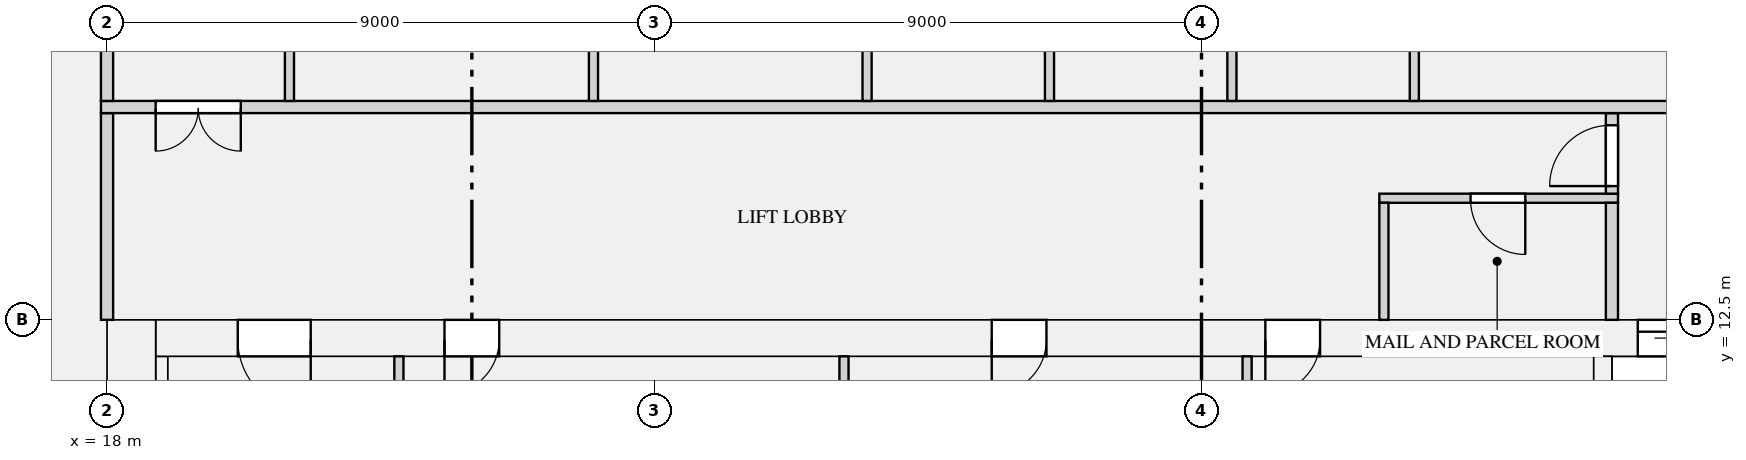
"""IFC4 building model, lengths in metres.
Left out: names, types, materials, properties, quantities, classifications, styles, units other than length and angle.
Written with IfcOpenShell. Run it as: python <this file> out.ifc"""

import sys

from ifc_helpers import new_model, si_unit, direction, frame, frame_2d, origin, place, context, subcontext, project, spatial, rectangle, extrude, element, fill, save


model = new_model("IFC4")
c1 = context("Model", 3, precision=1e-05, world=origin(), true_north=direction((0.0, 1.0)))
c2 = subcontext(c1, "Body", "Model", "MODEL_VIEW")
j1 = project(units=[si_unit("LENGTHUNIT", "METRE"), si_unit("PLANEANGLEUNIT", "RADIAN")], contexts=[c1])
p1 = place(None, origin())
s1 = spatial("IfcSite", under=j1, at=p1, CompositionType="ELEMENT")
p2 = place(p1, origin())
s2 = spatial("IfcBuilding", under=s1, at=p2, CompositionType="ELEMENT")
p3 = place(p2, frame((0.0, 0.0, 102.45)))
s3 = spatial("IfcBuildingStorey", under=s2, at=p3, CompositionType="ELEMENT", Elevation=102.45)
p4 = place(p3, frame((18.4, 0.0, 0.0), z_axis=(0.0, 0.0, 1.0), x_axis=(0.0, 1.0, 0.0)))
e1 = element("IfcWall", 1, at=p4, inside=s3, PredefinedType="SHEAR", context=c2, shape_type="SweptSolid", body=[
    extrude(rectangle(XDim=12.5, YDim=0.8, at=frame_2d((6.25, 0.0))), origin(), (0.0, 0.0, 1.0), 3.15),
])
p5 = place(p3, frame((18.8, 12.2, 0.0), z_axis=(0.0, 0.0, 1.0), x_axis=(1.0, 0.0, 0.0)))
e2 = element("IfcWall", 2, at=p5, inside=s3, PredefinedType="SHEAR", context=c2, shape_type="SweptSolid", body=[
    extrude(rectangle(XDim=34.4, YDim=0.6, at=frame_2d((17.2, 0.0))), origin(), (0.0, 0.0, 1.0), 3.15),
])
p6 = place(p5, frame((24.375, 0.0, 0.0)))
e3 = element("IfcOpeningElement", 3, at=p6, cuts=e2, PredefinedType="OPENING", context=c2, shape_type="SweptSolid", body=[
    extrude(rectangle(XDim=1.1, YDim=2.1, at=frame_2d((0.55, 1.05))), frame((0.0, 0.31, 0.0), z_axis=(0.0, -1.0, 0.0), x_axis=(1.0, 0.0, 0.0)), (0.0, 0.0, 1.0), 0.62),
])
p7 = place(p5, frame((26.625, 0.0, 0.0)))
e4 = element("IfcOpeningElement", 4, at=p7, cuts=e2, PredefinedType="OPENING", context=c2, shape_type="SweptSolid", body=[
    extrude(rectangle(XDim=1.1, YDim=2.1, at=frame_2d((0.55, 1.05))), frame((0.0, 0.31, 0.0), z_axis=(0.0, -1.0, 0.0), x_axis=(1.0, 0.0, 0.0)), (0.0, 0.0, 1.0), 0.62),
])
p8 = place(p5, frame((28.875, 0.0, 0.0)))
e5 = element("IfcOpeningElement", 5, at=p8, cuts=e2, PredefinedType="OPENING", context=c2, shape_type="SweptSolid", body=[
    extrude(rectangle(XDim=1.1, YDim=2.1, at=frame_2d((0.55, 1.05))), frame((0.0, 0.31, 0.0), z_axis=(0.0, -1.0, 0.0), x_axis=(1.0, 0.0, 0.0)), (0.0, 0.0, 1.0), 0.62),
])
p9 = place(p5, frame((4.75, 0.0, 0.0)))
e6 = element("IfcOpeningElement", 6, at=p9, cuts=e2, PredefinedType="OPENING", context=c2, shape_type="SweptSolid", body=[
    extrude(rectangle(XDim=0.9, YDim=2.1, at=frame_2d((0.45, 1.05))), frame((0.0, 0.31, 0.0), z_axis=(0.0, -1.0, 0.0), x_axis=(1.0, 0.0, 0.0)), (0.0, 0.0, 1.0), 0.62),
])
p10 = place(p5, frame((13.75, 0.0, 0.0)))
e7 = element("IfcOpeningElement", 7, at=p10, cuts=e2, PredefinedType="OPENING", context=c2, shape_type="SweptSolid", body=[
    extrude(rectangle(XDim=0.9, YDim=2.1, at=frame_2d((0.45, 1.05))), frame((0.0, 0.31, 0.0), z_axis=(0.0, -1.0, 0.0), x_axis=(1.0, 0.0, 0.0)), (0.0, 0.0, 1.0), 0.62),
])
p11 = place(p5, frame((18.25, 0.0, 0.0)))
e8 = element("IfcOpeningElement", 8, at=p11, cuts=e2, PredefinedType="OPENING", context=c2, shape_type="SweptSolid", body=[
    extrude(rectangle(XDim=0.9, YDim=2.1, at=frame_2d((0.45, 1.05))), frame((0.0, 0.31, 0.0), z_axis=(0.0, -1.0, 0.0), x_axis=(1.0, 0.0, 0.0)), (0.0, 0.0, 1.0), 0.62),
])
p12 = place(p5, frame((1.35, 0.0, 0.0)))
e9 = element("IfcOpeningElement", 9, at=p12, cuts=e2, PredefinedType="OPENING", context=c2, shape_type="SweptSolid", body=[
    extrude(rectangle(XDim=1.2, YDim=2.1, at=frame_2d((0.6, 1.05))), frame((0.0, 0.31, 0.0), z_axis=(0.0, -1.0, 0.0), x_axis=(1.0, 0.0, 0.0)), (0.0, 0.0, 1.0), 0.62),
])
p13 = place(p5, frame((31.85, 0.0, 0.0)))
e10 = element("IfcOpeningElement", 10, at=p13, cuts=e2, PredefinedType="OPENING", context=c2, shape_type="SweptSolid", body=[
    extrude(rectangle(XDim=1.2, YDim=2.1, at=frame_2d((0.6, 1.05))), frame((0.0, 0.31, 0.0), z_axis=(0.0, -1.0, 0.0), x_axis=(1.0, 0.0, 0.0)), (0.0, 0.0, 1.0), 0.62),
])
p14 = place(p3, frame((18.9, 1.0, 0.0), z_axis=(0.0, 0.0, 1.0), x_axis=(0.0, 1.0, 0.0)))
e11 = element("IfcWall", 11, at=p14, inside=s3, PredefinedType="SHEAR", context=c2, shape_type="SweptSolid", body=[
    extrude(rectangle(XDim=10.9, YDim=0.2, at=frame_2d((5.45, 0.0))), origin(), (0.0, 0.0, 1.0), 3.15),
])
p15 = place(p3, frame((42.6, 8.25, 0.0), z_axis=(0.0, 0.0, 1.0), x_axis=(0.0, 1.0, 0.0)))
e12 = element("IfcWall", 12, at=p15, inside=s3, PredefinedType="SHEAR", context=c2, shape_type="SweptSolid", body=[
    extrude(rectangle(XDim=3.65, YDim=0.3, at=frame_2d((1.825, 0.0))), origin(), (0.0, 0.0, 1.0), 3.15),
])
p16 = place(p3, frame((38.925, 14.5, 0.0), z_axis=(0.0, 0.0, 1.0), x_axis=(1.0, 0.0, 0.0)))
e13 = element("IfcWall", 13, at=p16, inside=s3, PredefinedType="PARTITIONING", context=c2, shape_type="SweptSolid", body=[
    extrude(rectangle(XDim=3.925, YDim=0.15, at=frame_2d((1.962, 0.0))), origin(), (0.0, 0.0, 1.0), 2.83),
])
p17 = place(p16, frame((1.5, 0.0, 0.0)))
e14 = element("IfcOpeningElement", 14, at=p17, cuts=e13, PredefinedType="OPENING", context=c2, shape_type="SweptSolid", body=[
    extrude(rectangle(XDim=0.9, YDim=2.1, at=frame_2d((0.45, 1.05))), frame((0.0, 0.085, 0.0), z_axis=(0.0, -1.0, 0.0), x_axis=(1.0, 0.0, 0.0)), (0.0, 0.0, 1.0), 0.17),
])
for number, where, z_axis, x_axis in (
    (15, (22.8, 9.185, 0.0), (0.0, 0.0, 1.0), (0.0, 1.0, 0.0)),
    (16, (30.12, 9.185, 0.0), (0.0, 0.0, 1.0), (0.0, 1.0, 0.0)),
):
    element("IfcWall", number, at=place(p3, frame(where, z_axis=z_axis, x_axis=x_axis)), inside=s3, PredefinedType="PARTITIONING", context=c2, shape_type="SweptSolid", body=[
        extrude(rectangle(XDim=2.715, YDim=0.15, at=frame_2d((1.357, 0.0))), origin(), (0.0, 0.0, 1.0), 2.83),
    ])
p18 = place(p3, frame((36.75, 9.575, 0.0), z_axis=(0.0, 0.0, 1.0), x_axis=(0.0, 1.0, 0.0)))
e17 = element("IfcWall", 17, at=p18, inside=s3, PredefinedType="PARTITIONING", context=c2, shape_type="SweptSolid", body=[
    extrude(rectangle(XDim=2.325, YDim=0.15, at=frame_2d((1.163, 0.0))), origin(), (0.0, 0.0, 1.0), 2.83),
])
p19 = place(p3, frame((18.0, 12.5, 0.0), z_axis=(0.0, 0.0, 1.0), x_axis=(0.0, 1.0, 0.0)))
e18 = element("IfcWall", 18, at=p19, inside=s3, PredefinedType="PARTITIONING", context=c2, shape_type="SweptSolid", body=[
    extrude(rectangle(XDim=3.4, YDim=0.2, at=frame_2d((1.7, 0.0))), origin(), (0.0, 0.0, 1.0), 2.83),
])
p20 = place(p3, frame((39.0, 12.5, 0.0), z_axis=(0.0, 0.0, 1.0), x_axis=(0.0, 1.0, 0.0)))
e19 = element("IfcWall", 19, at=p20, inside=s3, PredefinedType="PARTITIONING", context=c2, shape_type="SweptSolid", body=[
    extrude(rectangle(XDim=1.925, YDim=0.15, at=frame_2d((0.962, 0.0))), origin(), (0.0, 0.0, 1.0), 2.83),
])
p21 = place(p3, frame((42.75, 12.5, 0.0), z_axis=(0.0, 0.0, 1.0), x_axis=(0.0, 1.0, 0.0)))
e20 = element("IfcWall", 20, at=p21, inside=s3, PredefinedType="PARTITIONING", context=c2, shape_type="SweptSolid", body=[
    extrude(rectangle(XDim=1.925, YDim=0.2, at=frame_2d((0.962, 0.0))), origin(), (0.0, 0.0, 1.0), 2.83),
])
p22 = place(p3, frame((42.75, 14.575, 0.0), z_axis=(0.0, 0.0, 1.0), x_axis=(0.0, 1.0, 0.0)))
e21 = element("IfcWall", 21, at=p22, inside=s3, PredefinedType="PARTITIONING", context=c2, shape_type="SweptSolid", body=[
    extrude(rectangle(XDim=1.325, YDim=0.2, at=frame_2d((0.663, 0.0))), origin(), (0.0, 0.0, 1.0), 2.83),
])
p23 = place(p22, frame((0.125, 0.0, 0.0)))
e22 = element("IfcOpeningElement", 22, at=p23, cuts=e21, PredefinedType="OPENING", context=c2, shape_type="SweptSolid", body=[
    extrude(rectangle(XDim=1.0, YDim=2.1, at=frame_2d((0.5, 1.05))), frame((0.0, 0.11, 0.0), z_axis=(0.0, -1.0, 0.0), x_axis=(1.0, 0.0, 0.0)), (0.0, 0.0, 1.0), 0.22),
])
p24 = place(p3, frame((17.9, 16.0, 0.0), z_axis=(0.0, 0.0, 1.0), x_axis=(1.0, 0.0, 0.0)))
e23 = element("IfcWall", 23, at=p24, inside=s3, PredefinedType="PARTITIONING", context=c2, shape_type="SweptSolid", body=[
    extrude(rectangle(XDim=36.2, YDim=0.2, at=frame_2d((18.1, 0.0))), origin(), (0.0, 0.0, 1.0), 2.83),
])
p25 = place(p24, frame((0.9, 0.0, 0.0)))
e24 = element("IfcOpeningElement", 24, at=p25, cuts=e23, PredefinedType="OPENING", context=c2, shape_type="SweptSolid", body=[
    extrude(rectangle(XDim=1.4, YDim=2.1, at=frame_2d((0.7, 1.05))), frame((0.0, 0.11, 0.0), z_axis=(0.0, -1.0, 0.0), x_axis=(1.0, 0.0, 0.0)), (0.0, 0.0, 1.0), 0.22),
])
p26 = place(p24, frame((33.9, 0.0, 0.0)))
e25 = element("IfcOpeningElement", 25, at=p26, cuts=e23, PredefinedType="OPENING", context=c2, shape_type="SweptSolid", body=[
    extrude(rectangle(XDim=1.4, YDim=2.1, at=frame_2d((0.7, 1.05))), frame((0.0, 0.11, 0.0), z_axis=(0.0, -1.0, 0.0), x_axis=(1.0, 0.0, 0.0)), (0.0, 0.0, 1.0), 0.22),
])
p27 = place(p3, frame((18.0, 16.1, 0.0), z_axis=(0.0, 0.0, 1.0), x_axis=(0.0, 1.0, 0.0)))
e26 = element("IfcWall", 26, at=p27, inside=s3, PredefinedType="PARTITIONING", context=c2, shape_type="SweptSolid", body=[
    extrude(rectangle(XDim=7.8, YDim=0.2, at=frame_2d((3.9, 0.0))), origin(), (0.0, 0.0, 1.0), 2.83),
])
p28 = place(p27, frame((2.35, 0.0, 0.0)))
e27 = element("IfcOpeningElement", 27, at=p28, cuts=e26, PredefinedType="OPENING", context=c2, shape_type="SweptSolid", body=[
    extrude(rectangle(XDim=1.1, YDim=2.1, at=frame_2d((0.55, 1.05))), frame((0.0, 0.11, 0.0), z_axis=(0.0, -1.0, 0.0), x_axis=(1.0, 0.0, 0.0)), (0.0, 0.0, 1.0), 0.22),
])
for number, where, z_axis, x_axis in (
    (28, (21.0, 16.1, 0.0), (0.0, 0.0, 1.0), (0.0, 1.0, 0.0)),
    (29, (26.0, 16.1, 0.0), (0.0, 0.0, 1.0), (0.0, 1.0, 0.0)),
    (30, (30.5, 16.1, 0.0), (0.0, 0.0, 1.0), (0.0, 1.0, 0.0)),
    (31, (33.5, 16.1, 0.0), (0.0, 0.0, 1.0), (0.0, 1.0, 0.0)),
    (32, (36.5, 16.1, 0.0), (0.0, 0.0, 1.0), (0.0, 1.0, 0.0)),
    (33, (39.5, 16.1, 0.0), (0.0, 0.0, 1.0), (0.0, 1.0, 0.0)),
):
    element("IfcWall", number, at=place(p3, frame(where, z_axis=z_axis, x_axis=x_axis)), inside=s3, PredefinedType="PARTITIONING", context=c2, shape_type="SweptSolid", body=[
        extrude(rectangle(XDim=4.825, YDim=0.15, at=frame_2d((2.413, 0.0))), origin(), (0.0, 0.0, 1.0), 2.83),
    ])
p29 = place(p6, origin())
e34 = element("IfcDoor", 34, at=p29, inside=s3, OperationType="DOUBLE_DOOR_SLIDING", PredefinedType="DOOR", context=c2, shape_type="SweptSolid", body=[
    extrude(rectangle(XDim=1.1, YDim=2.1, at=frame_2d((0.55, 1.05))), frame((0.0, 0.025, 0.0), z_axis=(0.0, -1.0, 0.0), x_axis=(1.0, 0.0, 0.0)), (0.0, 0.0, 1.0), 0.05),
])
fill(e3, e34)
p30 = place(p17, frame((0.9, 0.0, 0.0), z_axis=(0.0, 0.0, 1.0), x_axis=(-1.0, 0.0, 0.0)))
e35 = element("IfcDoor", 35, at=p30, inside=s3, OperationType="SINGLE_SWING_LEFT", PredefinedType="DOOR", context=c2, shape_type="SweptSolid", body=[
    extrude(rectangle(XDim=0.9, YDim=2.1, at=frame_2d((0.45, 1.05))), frame((0.0, 0.025, 0.0), z_axis=(0.0, -1.0, 0.0), x_axis=(1.0, 0.0, 0.0)), (0.0, 0.0, 1.0), 0.05),
])
fill(e14, e35)
p31 = place(p9, frame((0.9, 0.0, 0.0), z_axis=(0.0, 0.0, 1.0), x_axis=(-1.0, 0.0, 0.0)))
e36 = element("IfcDoor", 36, at=p31, inside=s3, OperationType="SINGLE_SWING_RIGHT", PredefinedType="DOOR", context=c2, shape_type="SweptSolid", body=[
    extrude(rectangle(XDim=0.9, YDim=2.1, at=frame_2d((0.45, 1.05))), frame((0.0, 0.025, 0.0), z_axis=(0.0, -1.0, 0.0), x_axis=(1.0, 0.0, 0.0)), (0.0, 0.0, 1.0), 0.05),
])
fill(e6, e36)
p32 = place(p10, frame((0.9, 0.0, 0.0), z_axis=(0.0, 0.0, 1.0), x_axis=(-1.0, 0.0, 0.0)))
e37 = element("IfcDoor", 37, at=p32, inside=s3, OperationType="SINGLE_SWING_RIGHT", PredefinedType="DOOR", context=c2, shape_type="SweptSolid", body=[
    extrude(rectangle(XDim=0.9, YDim=2.1, at=frame_2d((0.45, 1.05))), frame((0.0, 0.025, 0.0), z_axis=(0.0, -1.0, 0.0), x_axis=(1.0, 0.0, 0.0)), (0.0, 0.0, 1.0), 0.05),
])
fill(e7, e37)
p33 = place(p11, frame((0.9, 0.0, 0.0), z_axis=(0.0, 0.0, 1.0), x_axis=(-1.0, 0.0, 0.0)))
e38 = element("IfcDoor", 38, at=p33, inside=s3, OperationType="SINGLE_SWING_RIGHT", PredefinedType="DOOR", context=c2, shape_type="SweptSolid", body=[
    extrude(rectangle(XDim=0.9, YDim=2.1, at=frame_2d((0.45, 1.05))), frame((0.0, 0.025, 0.0), z_axis=(0.0, -1.0, 0.0), x_axis=(1.0, 0.0, 0.0)), (0.0, 0.0, 1.0), 0.05),
])
fill(e8, e38)
p34 = place(p12, frame((1.2, 0.0, 0.0), z_axis=(0.0, 0.0, 1.0), x_axis=(-1.0, 0.0, 0.0)))
e39 = element("IfcDoor", 39, at=p34, inside=s3, OperationType="SINGLE_SWING_LEFT", PredefinedType="DOOR", context=c2, shape_type="SweptSolid", body=[
    extrude(rectangle(XDim=1.2, YDim=2.1, at=frame_2d((0.6, 1.05))), frame((0.0, 0.025, 0.0), z_axis=(0.0, -1.0, 0.0), x_axis=(1.0, 0.0, 0.0)), (0.0, 0.0, 1.0), 0.05),
])
fill(e9, e39)
p35 = place(p23, origin())
e40 = element("IfcDoor", 40, at=p35, inside=s3, OperationType="SINGLE_SWING_LEFT", PredefinedType="DOOR", context=c2, shape_type="SweptSolid", body=[
    extrude(rectangle(XDim=1.0, YDim=2.1, at=frame_2d((0.5, 1.05))), frame((0.0, 0.025, 0.0), z_axis=(0.0, -1.0, 0.0), x_axis=(1.0, 0.0, 0.0)), (0.0, 0.0, 1.0), 0.05),
])
fill(e22, e40)
p36 = place(p25, frame((1.4, 0.0, 0.0), z_axis=(0.0, 0.0, 1.0), x_axis=(-1.0, 0.0, 0.0)))
e41 = element("IfcDoor", 41, at=p36, inside=s3, OperationType="DOUBLE_DOOR_SINGLE_SWING", PredefinedType="DOOR", context=c2, shape_type="SweptSolid", body=[
    extrude(rectangle(XDim=1.4, YDim=2.1, at=frame_2d((0.7, 1.05))), frame((0.0, 0.025, 0.0), z_axis=(0.0, -1.0, 0.0), x_axis=(1.0, 0.0, 0.0)), (0.0, 0.0, 1.0), 0.05),
])
fill(e24, e41)
save(model, sys.argv[1])
